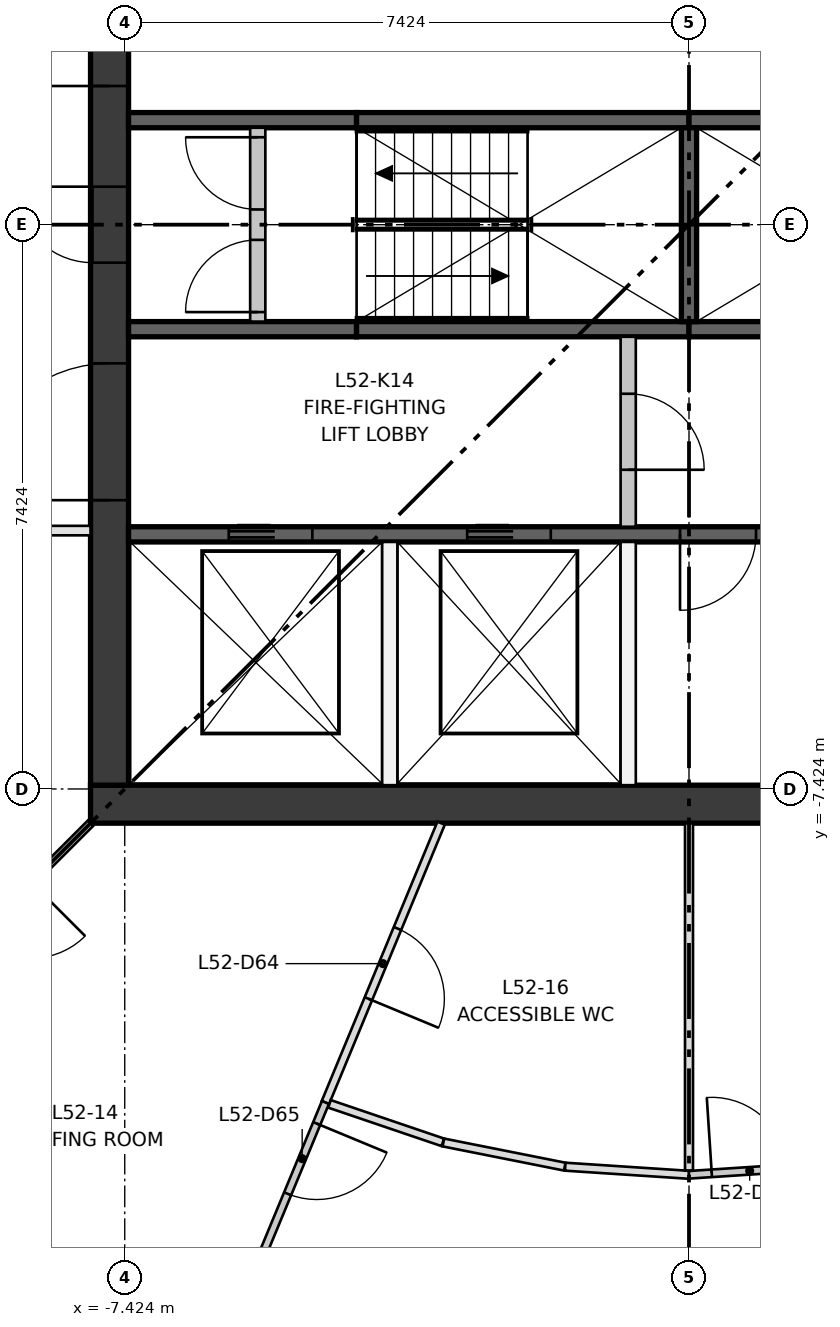
"""IFC4 building model, lengths in metres.
Left out: names, types, materials, properties, quantities, classifications, styles, units other than length and angle.
Written with IfcOpenShell. Run it as: python <this file> out.ifc"""

import sys

from ifc_helpers import new_model, si_unit, direction, frame, frame_2d, origin, place, context, subcontext, project, spatial, rectangle, extrude, element, fill, save


model = new_model("IFC4")
c1 = context("Model", 3, precision=1e-05, world=origin(), true_north=direction((0.0, 1.0)))
c2 = subcontext(c1, "Body", "Model", "MODEL_VIEW")
j1 = project(units=[si_unit("LENGTHUNIT", "METRE"), si_unit("PLANEANGLEUNIT", "RADIAN")], contexts=[c1])
p1 = place(None, origin())
s1 = spatial("IfcSite", under=j1, at=p1, CompositionType="ELEMENT")
p2 = place(p1, origin())
s2 = spatial("IfcBuilding", under=s1, at=p2, CompositionType="ELEMENT")
p3 = place(p2, frame((0.0, 0.0, 194.35)))
s3 = spatial("IfcBuildingStorey", under=s2, at=p3, CompositionType="ELEMENT", Elevation=194.35)
p4 = place(p3, frame((-7.874, -7.624, 0.0), z_axis=(0.0, 0.0, 1.0), x_axis=(1.0, 0.0, 0.0)))
e1 = element("IfcWall", 1, at=p4, inside=s3, PredefinedType="SHEAR", context=c2, shape_type="SweptSolid", body=[
    extrude(rectangle(XDim=15.748, YDim=0.5, at=frame_2d((7.874, 0.0))), origin(), (0.0, 0.0, 1.0), 3.35),
])
p5 = place(p3, frame((-7.624, -7.374, 0.0), z_axis=(0.0, 0.0, 1.0), x_axis=(0.0, 1.0, 0.0)))
e2 = element("IfcWall", 2, at=p5, inside=s3, PredefinedType="SHEAR", context=c2, shape_type="SweptSolid", body=[
    extrude(rectangle(XDim=14.748, YDim=0.5, at=frame_2d((7.374, 0.0))), origin(), (0.0, 0.0, 1.0), 3.35),
])
p6 = place(p5, frame((6.874, 0.0, 0.0)))
e3 = element("IfcOpeningElement", 3, at=p6, cuts=e2, PredefinedType="OPENING", context=c2, shape_type="SweptSolid", body=[
    extrude(rectangle(XDim=1.0, YDim=2.1, at=frame_2d((0.5, 1.05))), frame((0.0, 0.26, 0.0), z_axis=(0.0, -1.0, 0.0), x_axis=(1.0, 0.0, 0.0)), (0.0, 0.0, 1.0), 0.52),
])
p7 = place(p5, frame((3.75, 0.0, 0.0)))
e4 = element("IfcOpeningElement", 4, at=p7, cuts=e2, PredefinedType="OPENING", context=c2, shape_type="SweptSolid", body=[
    extrude(rectangle(XDim=1.8, YDim=2.1, at=frame_2d((0.9, 1.05))), frame((0.0, 0.26, 0.0), z_axis=(0.0, -1.0, 0.0), x_axis=(1.0, 0.0, 0.0)), (0.0, 0.0, 1.0), 0.52),
])
p8 = place(p5, frame((9.198, 0.0, 0.0)))
e5 = element("IfcOpeningElement", 5, at=p8, cuts=e2, PredefinedType="OPENING", context=c2, shape_type="SweptSolid", body=[
    extrude(rectangle(XDim=1.8, YDim=2.1, at=frame_2d((0.9, 1.05))), frame((0.0, 0.26, 0.0), z_axis=(0.0, -1.0, 0.0), x_axis=(1.0, 0.0, 0.0)), (0.0, 0.0, 1.0), 0.52),
])
p9 = place(p3, frame((-7.374, -4.074, 0.0), z_axis=(0.0, 0.0, 1.0), x_axis=(1.0, 0.0, 0.0)))
e6 = element("IfcWall", 6, at=p9, inside=s3, PredefinedType="SHEAR", context=c2, shape_type="SweptSolid", body=[
    extrude(rectangle(XDim=14.748, YDim=0.2, at=frame_2d((7.374, 0.0))), origin(), (0.0, 0.0, 1.0), 3.0),
])
p10 = place(p9, frame((1.319, 0.0, 0.0)))
e7 = element("IfcOpeningElement", 7, at=p10, cuts=e6, PredefinedType="OPENING", context=c2, shape_type="SweptSolid", body=[
    extrude(rectangle(XDim=1.1, YDim=2.1, at=frame_2d((0.55, 1.05))), frame((0.0, 0.11, 0.0), z_axis=(0.0, -1.0, 0.0), x_axis=(1.0, 0.0, 0.0)), (0.0, 0.0, 1.0), 0.22),
])
p11 = place(p9, frame((4.456, 0.0, 0.0)))
e8 = element("IfcOpeningElement", 8, at=p11, cuts=e6, PredefinedType="OPENING", context=c2, shape_type="SweptSolid", body=[
    extrude(rectangle(XDim=1.1, YDim=2.1, at=frame_2d((0.55, 1.05))), frame((0.0, 0.11, 0.0), z_axis=(0.0, -1.0, 0.0), x_axis=(1.0, 0.0, 0.0)), (0.0, 0.0, 1.0), 0.22),
])
p12 = place(p9, frame((7.256, 0.0, 0.0)))
e9 = element("IfcOpeningElement", 9, at=p12, cuts=e6, PredefinedType="OPENING", context=c2, shape_type="SweptSolid", body=[
    extrude(rectangle(XDim=1.0, YDim=2.1, at=frame_2d((0.5, 1.05))), frame((0.0, 0.11, 0.0), z_axis=(0.0, -1.0, 0.0), x_axis=(1.0, 0.0, 0.0)), (0.0, 0.0, 1.0), 0.22),
])
p13 = place(p9, frame((9.275, 0.0, 0.0)))
e10 = element("IfcOpeningElement", 10, at=p13, cuts=e6, PredefinedType="OPENING", context=c2, shape_type="SweptSolid", body=[
    extrude(rectangle(XDim=1.0, YDim=2.1, at=frame_2d((0.5, 1.05))), frame((0.0, 0.11, 0.0), z_axis=(0.0, -1.0, 0.0), x_axis=(1.0, 0.0, 0.0)), (0.0, 0.0, 1.0), 0.22),
])
p14 = place(p9, frame((10.95, 0.0, 0.0)))
e11 = element("IfcOpeningElement", 11, at=p14, cuts=e6, PredefinedType="OPENING", context=c2, shape_type="SweptSolid", body=[
    extrude(rectangle(XDim=1.0, YDim=2.1, at=frame_2d((0.5, 1.05))), frame((0.0, 0.11, 0.0), z_axis=(0.0, -1.0, 0.0), x_axis=(1.0, 0.0, 0.0)), (0.0, 0.0, 1.0), 0.22),
])
p15 = place(p9, frame((13.068, 0.0, 0.0)))
e12 = element("IfcOpeningElement", 12, at=p15, cuts=e6, PredefinedType="OPENING", context=c2, shape_type="SweptSolid", body=[
    extrude(rectangle(XDim=1.0, YDim=2.1, at=frame_2d((0.5, 1.05))), frame((0.0, 0.11, 0.0), z_axis=(0.0, -1.0, 0.0), x_axis=(1.0, 0.0, 0.0)), (0.0, 0.0, 1.0), 0.22),
])
p16 = place(p3, frame((-7.374, -1.375, 0.0), z_axis=(0.0, 0.0, 1.0), x_axis=(1.0, 0.0, 0.0)))
e13 = element("IfcWall", 13, at=p16, inside=s3, PredefinedType="SHEAR", context=c2, shape_type="SweptSolid", body=[
    extrude(rectangle(XDim=3.0, YDim=0.2, at=frame_2d((1.5, 0.0))), origin(), (0.0, 0.0, 1.0), 3.0),
])
for number, where, z_axis, x_axis in (
    (14, (-4.374, -1.375, 0.0), (0.0, 0.0, 1.0), (1.0, 0.0, 0.0)),
    (15, (0.0, -1.375, 0.0), (0.0, 0.0, 1.0), (1.0, 0.0, 0.0)),
):
    element("IfcWall", number, at=place(p3, frame(where, z_axis=z_axis, x_axis=x_axis)), inside=s3, PredefinedType="SHEAR", context=c2, shape_type="SweptSolid", body=[
        extrude(rectangle(XDim=4.374, YDim=0.2, at=frame_2d((2.187, 0.0))), origin(), (0.0, 0.0, 1.0), 3.0),
    ])
p17 = place(p3, frame((-7.374, 1.375, 0.0), z_axis=(0.0, 0.0, 1.0), x_axis=(1.0, 0.0, 0.0)))
e16 = element("IfcWall", 16, at=p17, inside=s3, PredefinedType="SHEAR", context=c2, shape_type="SweptSolid", body=[
    extrude(rectangle(XDim=3.0, YDim=0.2, at=frame_2d((1.5, 0.0))), origin(), (0.0, 0.0, 1.0), 3.0),
])
for number, where, z_axis, x_axis in (
    (17, (-4.374, 1.375, 0.0), (0.0, 0.0, 1.0), (1.0, 0.0, 0.0)),
    (18, (0.0, 1.375, 0.0), (0.0, 0.0, 1.0), (1.0, 0.0, 0.0)),
):
    element("IfcWall", number, at=place(p3, frame(where, z_axis=z_axis, x_axis=x_axis)), inside=s3, PredefinedType="SHEAR", context=c2, shape_type="SweptSolid", body=[
        extrude(rectangle(XDim=4.374, YDim=0.2, at=frame_2d((2.187, 0.0))), origin(), (0.0, 0.0, 1.0), 3.0),
    ])
p18 = place(p3, frame((0.0, -1.275, 0.0), z_axis=(0.0, 0.0, 1.0), x_axis=(0.0, 1.0, 0.0)))
e19 = element("IfcWall", 19, at=p18, inside=s3, PredefinedType="SHEAR", context=c2, shape_type="SweptSolid", body=[
    extrude(rectangle(XDim=2.55, YDim=0.2, at=frame_2d((1.275, 0.0))), origin(), (0.0, 0.0, 1.0), 3.0),
])
for number, where, z_axis, x_axis in (
    (20, (-3.937, -7.374, 0.0), (0.0, 0.0, 1.0), (0.0, 1.0, 0.0)),
    (21, (-0.8, -7.374, 0.0), (0.0, 0.0, 1.0), (0.0, 1.0, 0.0)),
):
    element("IfcWall", number, at=place(p3, frame(where, z_axis=z_axis, x_axis=x_axis)), inside=s3, PredefinedType="PARTITIONING", context=c2, shape_type="SweptSolid", body=[
        extrude(rectangle(XDim=3.2, YDim=0.2, at=frame_2d((1.6, 0.0))), origin(), (0.0, 0.0, 1.0), 3.0),
    ])
p19 = place(p3, frame((-0.8, -3.974, 0.0), z_axis=(0.0, 0.0, 1.0), x_axis=(0.0, 1.0, 0.0)))
e22 = element("IfcWall", 22, at=p19, inside=s3, PredefinedType="PARTITIONING", context=c2, shape_type="SweptSolid", body=[
    extrude(rectangle(XDim=2.499, YDim=0.2, at=frame_2d((1.25, 0.0))), origin(), (0.0, 0.0, 1.0), 3.0),
])
p20 = place(p19, frame((0.75, 0.0, 0.0)))
e23 = element("IfcOpeningElement", 23, at=p20, cuts=e22, PredefinedType="OPENING", context=c2, shape_type="SweptSolid", body=[
    extrude(rectangle(XDim=1.0, YDim=2.1, at=frame_2d((0.5, 1.05))), frame((0.0, 0.11, 0.0), z_axis=(0.0, -1.0, 0.0), x_axis=(1.0, 0.0, 0.0)), (0.0, 0.0, 1.0), 0.22),
])
p21 = place(p3, frame((-5.674, -1.275, 0.0), z_axis=(0.0, 0.0, 1.0), x_axis=(0.0, 1.0, 0.0)))
e24 = element("IfcWall", 24, at=p21, inside=s3, PredefinedType="PARTITIONING", context=c2, shape_type="SweptSolid", body=[
    extrude(rectangle(XDim=2.55, YDim=0.2, at=frame_2d((1.275, 0.0))), origin(), (0.0, 0.0, 1.0), 3.0),
])
p22 = place(p21, frame((0.125, 0.0, 0.0)))
e25 = element("IfcOpeningElement", 25, at=p22, cuts=e24, PredefinedType="OPENING", context=c2, shape_type="SweptSolid", body=[
    extrude(rectangle(XDim=0.95, YDim=2.1, at=frame_2d((0.475, 1.05))), frame((0.0, 0.11, 0.0), z_axis=(0.0, -1.0, 0.0), x_axis=(1.0, 0.0, 0.0)), (0.0, 0.0, 1.0), 0.22),
])
p23 = place(p21, frame((1.475, 0.0, 0.0)))
e26 = element("IfcOpeningElement", 26, at=p23, cuts=e24, PredefinedType="OPENING", context=c2, shape_type="SweptSolid", body=[
    extrude(rectangle(XDim=0.95, YDim=2.1, at=frame_2d((0.475, 1.05))), frame((0.0, 0.11, 0.0), z_axis=(0.0, -1.0, 0.0), x_axis=(1.0, 0.0, 0.0)), (0.0, 0.0, 1.0), 0.22),
])
p24 = place(p3, frame((-7.874, -4.024, 0.0), z_axis=(0.0, 0.0, 1.0), x_axis=(-1.0, 0.0, 0.0)))
e27 = element("IfcWall", 27, at=p24, inside=s3, PredefinedType="PARTITIONING", context=c2, shape_type="SweptSolid", body=[
    extrude(rectangle(XDim=3.213, YDim=0.125, at=frame_2d((1.606, 0.0))), origin(), (0.0, 0.0, 1.0), 3.0),
])
p25 = place(p24, frame((1.1, 0.0, 0.0)))
e28 = element("IfcOpeningElement", 28, at=p25, cuts=e27, PredefinedType="OPENING", context=c2, shape_type="SweptSolid", body=[
    extrude(rectangle(XDim=1.0, YDim=2.1, at=frame_2d((0.5, 1.05))), frame((0.0, 0.073, 0.0), z_axis=(0.0, -1.0, 0.0), x_axis=(1.0, 0.0, 0.0)), (0.0, 0.0, 1.0), 0.145),
])
p26 = place(p3, frame((-7.874, -7.874, 0.0), z_axis=(0.0, 0.0, 1.0), x_axis=(-0.707106781187, -0.707106781187, 0.0)))
e29 = element("IfcWall", 29, at=p26, inside=s3, PredefinedType="PARTITIONING", context=c2, shape_type="SweptSolid", body=[
    extrude(rectangle(XDim=5.084, YDim=0.1, at=frame_2d((2.542, 0.0))), origin(), (0.0, 0.0, 1.0), 3.0),
])
p27 = place(p26, frame((1.1, 0.0, 0.0)))
e30 = element("IfcOpeningElement", 30, at=p27, cuts=e29, PredefinedType="OPENING", context=c2, shape_type="SweptSolid", body=[
    extrude(rectangle(XDim=1.0, YDim=2.1, at=frame_2d((0.5, 1.05))), frame((0.0, 0.06, 0.0), z_axis=(0.0, -1.0, 0.0), x_axis=(1.0, 0.0, 0.0)), (0.0, 0.0, 1.0), 0.12),
])
p28 = place(p3, frame((-3.261, -7.874, 0.0), z_axis=(0.0, 0.0, 1.0), x_axis=(-0.382666229821, -0.923886657851, 0.0)))
e31 = element("IfcWall", 31, at=p28, inside=s3, PredefinedType="PARTITIONING", context=c2, shape_type="SweptSolid", body=[
    extrude(rectangle(XDim=3.977, YDim=0.105, at=frame_2d((1.989, 0.0))), origin(), (0.0, 0.0, 1.0), 3.0),
])
p29 = place(p28, frame((1.5, 0.0, 0.0)))
e32 = element("IfcOpeningElement", 32, at=p29, cuts=e31, PredefinedType="OPENING", context=c2, shape_type="SweptSolid", body=[
    extrude(rectangle(XDim=1.0, YDim=2.1, at=frame_2d((0.5, 1.05))), frame((0.0, 0.062, 0.0), z_axis=(0.0, -1.0, 0.0), x_axis=(1.0, 0.0, 0.0)), (0.0, 0.0, 1.0), 0.125),
])
p30 = place(p3, frame((-4.783, -11.549, 0.0), z_axis=(0.0, 0.0, 1.0), x_axis=(-0.382689912762, -0.923876848216, 0.0)))
e33 = element("IfcWall", 33, at=p30, inside=s3, PredefinedType="PARTITIONING", context=c2, shape_type="SweptSolid", body=[
    extrude(rectangle(XDim=3.72, YDim=0.1, at=frame_2d((1.86, 0.0))), origin(), (0.0, 0.0, 1.0), 3.0),
])
p31 = place(p30, frame((0.3, 0.0, 0.0)))
e34 = element("IfcOpeningElement", 34, at=p31, cuts=e33, PredefinedType="OPENING", context=c2, shape_type="SweptSolid", body=[
    extrude(rectangle(XDim=1.0, YDim=2.1, at=frame_2d((0.5, 1.05))), frame((0.0, 0.06, 0.0), z_axis=(0.0, -1.0, 0.0), x_axis=(1.0, 0.0, 0.0)), (0.0, 0.0, 1.0), 0.12),
])
p32 = place(p3, frame((-3.239, -12.073, 0.0), z_axis=(0.0, 0.0, 1.0), x_axis=(-0.946902062217, 0.321522136982, 0.0)))
e35 = element("IfcWall", 35, at=p32, inside=s3, PredefinedType="PARTITIONING", context=c2, shape_type="SweptSolid", body=[
    extrude(rectangle(XDim=1.576, YDim=0.105, at=frame_2d((0.788, 0.0))), origin(), (0.0, 0.0, 1.0), 3.0),
])
p33 = place(p3, frame((-1.635, -12.392, 0.0), z_axis=(0.0, 0.0, 1.0), x_axis=(-0.980782034379, 0.195106640172, 0.0)))
e36 = element("IfcWall", 36, at=p33, inside=s3, PredefinedType="PARTITIONING", context=c2, shape_type="SweptSolid", body=[
    extrude(rectangle(XDim=1.628, YDim=0.105, at=frame_2d((0.814, 0.0))), origin(), (0.0, 0.0, 1.0), 3.0),
])
p34 = place(p3, frame((0.0, -12.5, 0.0), z_axis=(0.0, 0.0, 1.0), x_axis=(-0.997859990953, 0.065386837014, 0.0)))
e37 = element("IfcWall", 37, at=p34, inside=s3, PredefinedType="PARTITIONING", context=c2, shape_type="SweptSolid", body=[
    extrude(rectangle(XDim=1.632, YDim=0.105, at=frame_2d((0.816, 0.0))), origin(), (0.0, 0.0, 1.0), 3.0),
])
p35 = place(p3, frame((0.0, -7.874, 0.0), z_axis=(0.0, 0.0, 1.0), x_axis=(0.0, -1.0, 0.0)))
e38 = element("IfcWall", 38, at=p35, inside=s3, PredefinedType="PARTITIONING", context=c2, shape_type="SweptSolid", body=[
    extrude(rectangle(XDim=4.57, YDim=0.105, at=frame_2d((2.285, 0.0))), origin(), (0.0, 0.0, 1.0), 3.0),
])
p36 = place(p3, frame((0.0, -12.5, 0.0), z_axis=(0.0, 0.0, 1.0), x_axis=(0.997860630529, 0.065377075793, 0.0)))
e39 = element("IfcWall", 39, at=p36, inside=s3, PredefinedType="PARTITIONING", context=c2, shape_type="SweptSolid", body=[
    extrude(rectangle(XDim=1.632, YDim=0.1, at=frame_2d((0.816, 0.0))), origin(), (0.0, 0.0, 1.0), 3.0),
])
p37 = place(p36, frame((0.3, 0.0, 0.0)))
e40 = element("IfcOpeningElement", 40, at=p37, cuts=e39, PredefinedType="OPENING", context=c2, shape_type="SweptSolid", body=[
    extrude(rectangle(XDim=1.0, YDim=2.1, at=frame_2d((0.5, 1.05))), frame((0.0, 0.06, 0.0), z_axis=(0.0, -1.0, 0.0), x_axis=(1.0, 0.0, 0.0)), (0.0, 0.0, 1.0), 0.12),
])
p38 = place(p10, origin())
e41 = element("IfcDoor", 41, at=p38, inside=s3, OperationType="DOUBLE_DOOR_SLIDING", PredefinedType="DOOR", context=c2, shape_type="SweptSolid", body=[
    extrude(rectangle(XDim=1.1, YDim=2.1, at=frame_2d((0.55, 1.05))), frame((0.0, 0.025, 0.0), z_axis=(0.0, -1.0, 0.0), x_axis=(1.0, 0.0, 0.0)), (0.0, 0.0, 1.0), 0.05),
])
fill(e7, e41)
p39 = place(p11, origin())
e42 = element("IfcDoor", 42, at=p39, inside=s3, OperationType="DOUBLE_DOOR_SLIDING", PredefinedType="DOOR", context=c2, shape_type="SweptSolid", body=[
    extrude(rectangle(XDim=1.1, YDim=2.1, at=frame_2d((0.55, 1.05))), frame((0.0, 0.025, 0.0), z_axis=(0.0, -1.0, 0.0), x_axis=(1.0, 0.0, 0.0)), (0.0, 0.0, 1.0), 0.05),
])
fill(e8, e42)
p40 = place(p22, origin())
e43 = element("IfcDoor", 43, at=p40, inside=s3, OperationType="SINGLE_SWING_LEFT", PredefinedType="DOOR", context=c2, shape_type="SweptSolid", body=[
    extrude(rectangle(XDim=0.95, YDim=2.1, at=frame_2d((0.475, 1.05))), frame((0.0, 0.025, 0.0), z_axis=(0.0, -1.0, 0.0), x_axis=(1.0, 0.0, 0.0)), (0.0, 0.0, 1.0), 0.05),
])
fill(e25, e43)
p41 = place(p23, origin())
e44 = element("IfcDoor", 44, at=p41, inside=s3, OperationType="SINGLE_SWING_RIGHT", PredefinedType="DOOR", context=c2, shape_type="SweptSolid", body=[
    extrude(rectangle(XDim=0.95, YDim=2.1, at=frame_2d((0.475, 1.05))), frame((0.0, 0.025, 0.0), z_axis=(0.0, -1.0, 0.0), x_axis=(1.0, 0.0, 0.0)), (0.0, 0.0, 1.0), 0.05),
])
fill(e26, e44)
p42 = place(p20, frame((1.0, 0.0, 0.0), z_axis=(0.0, 0.0, 1.0), x_axis=(-1.0, 0.0, 0.0)))
e45 = element("IfcDoor", 45, at=p42, inside=s3, OperationType="SINGLE_SWING_LEFT", PredefinedType="DOOR", context=c2, shape_type="SweptSolid", body=[
    extrude(rectangle(XDim=1.0, YDim=2.1, at=frame_2d((0.5, 1.05))), frame((0.0, 0.025, 0.0), z_axis=(0.0, -1.0, 0.0), x_axis=(1.0, 0.0, 0.0)), (0.0, 0.0, 1.0), 0.05),
])
fill(e23, e45)
p43 = place(p12, frame((1.0, 0.0, 0.0), z_axis=(0.0, 0.0, 1.0), x_axis=(-1.0, 0.0, 0.0)))
e46 = element("IfcDoor", 46, at=p43, inside=s3, OperationType="SINGLE_SWING_LEFT", PredefinedType="DOOR", context=c2, shape_type="SweptSolid", body=[
    extrude(rectangle(XDim=1.0, YDim=2.1, at=frame_2d((0.5, 1.05))), frame((0.0, 0.025, 0.0), z_axis=(0.0, -1.0, 0.0), x_axis=(1.0, 0.0, 0.0)), (0.0, 0.0, 1.0), 0.05),
])
fill(e9, e46)
p44 = place(p6, origin())
e47 = element("IfcDoor", 47, at=p44, inside=s3, OperationType="SINGLE_SWING_RIGHT", PredefinedType="DOOR", context=c2, shape_type="SweptSolid", body=[
    extrude(rectangle(XDim=1.0, YDim=2.1, at=frame_2d((0.5, 1.05))), frame((0.0, 0.25, 0.0), z_axis=(0.0, -1.0, 0.0), x_axis=(1.0, 0.0, 0.0)), (0.0, 0.0, 1.0), 0.05),
])
fill(e3, e47)
p45 = place(p7, origin())
e48 = element("IfcDoor", 48, at=p45, inside=s3, OperationType="DOUBLE_DOOR_SINGLE_SWING", PredefinedType="DOOR", context=c2, shape_type="SweptSolid", body=[
    extrude(rectangle(XDim=1.8, YDim=2.1, at=frame_2d((0.9, 1.05))), frame((0.0, 0.025, 0.0), z_axis=(0.0, -1.0, 0.0), x_axis=(1.0, 0.0, 0.0)), (0.0, 0.0, 1.0), 0.05),
])
fill(e4, e48)
p46 = place(p8, origin())
e49 = element("IfcDoor", 49, at=p46, inside=s3, OperationType="DOUBLE_DOOR_SINGLE_SWING", PredefinedType="DOOR", context=c2, shape_type="SweptSolid", body=[
    extrude(rectangle(XDim=1.8, YDim=2.1, at=frame_2d((0.9, 1.05))), frame((0.0, 0.025, 0.0), z_axis=(0.0, -1.0, 0.0), x_axis=(1.0, 0.0, 0.0)), (0.0, 0.0, 1.0), 0.05),
])
fill(e5, e49)
p47 = place(p29, origin())
e50 = element("IfcDoor", 50, at=p47, inside=s3, OperationType="SINGLE_SWING_RIGHT", PredefinedType="DOOR", context=c2, shape_type="SweptSolid", body=[
    extrude(rectangle(XDim=1.0, YDim=2.1, at=frame_2d((0.5, 1.05))), frame((0.0, 0.025, 0.0), z_axis=(0.0, -1.0, 0.0), x_axis=(1.0, 0.0, 0.0)), (0.0, 0.0, 1.0), 0.05),
])
fill(e32, e50)
p48 = place(p31, origin())
e51 = element("IfcDoor", 51, at=p48, inside=s3, OperationType="SINGLE_SWING_LEFT", PredefinedType="DOOR", context=c2, shape_type="SweptSolid", body=[
    extrude(rectangle(XDim=1.0, YDim=2.1, at=frame_2d((0.5, 1.05))), frame((0.0, 0.025, 0.0), z_axis=(0.0, -1.0, 0.0), x_axis=(1.0, 0.0, 0.0)), (0.0, 0.0, 1.0), 0.05),
])
fill(e34, e51)
p49 = place(p37, origin())
e52 = element("IfcDoor", 52, at=p49, inside=s3, OperationType="SINGLE_SWING_LEFT", PredefinedType="DOOR", context=c2, shape_type="SweptSolid", body=[
    extrude(rectangle(XDim=1.0, YDim=2.1, at=frame_2d((0.5, 1.05))), frame((0.0, 0.025, 0.0), z_axis=(0.0, -1.0, 0.0), x_axis=(1.0, 0.0, 0.0)), (0.0, 0.0, 1.0), 0.05),
])
fill(e40, e52)
save(model, sys.argv[1])
